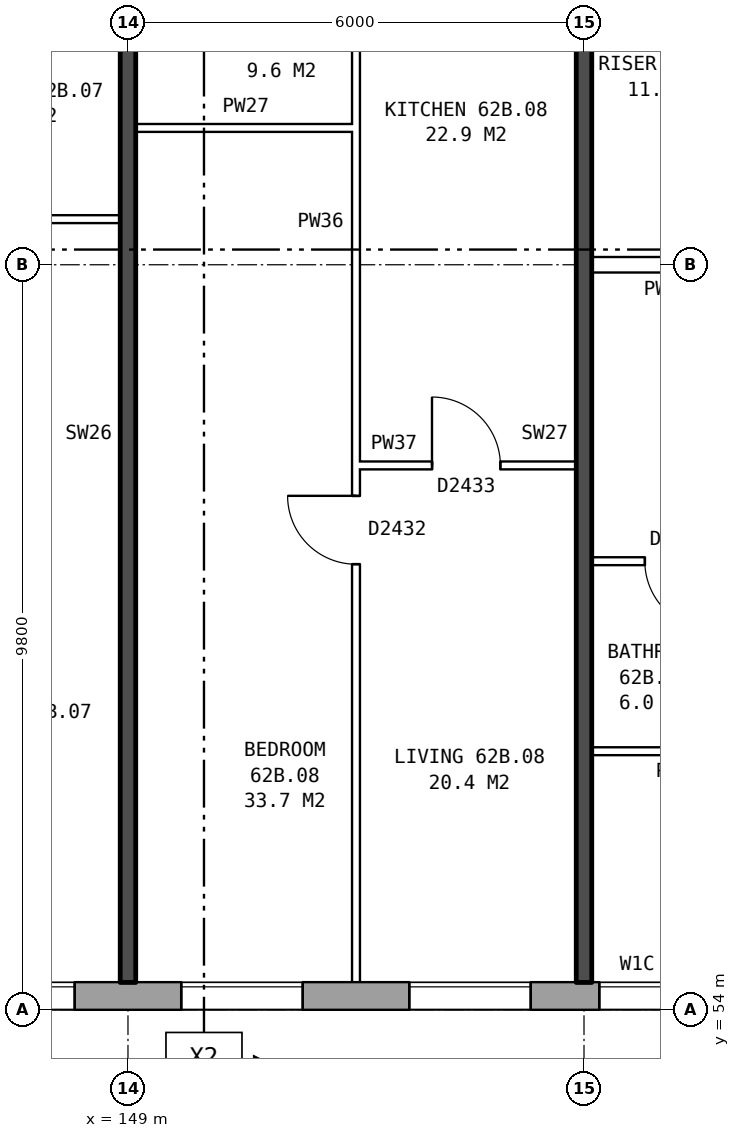
"""IFC4 building model, lengths in metres.
Left out: names, types, materials, properties, quantities, classifications, styles, units other than length and angle.
Written with IfcOpenShell. Run it as: python <this file> out.ifc"""

import sys

from ifc_helpers import new_model, si_unit, direction, frame, frame_2d, origin, place, context, subcontext, project, spatial, rectangle, extrude, element, fill, save


model = new_model("IFC4")
c1 = context("Model", 3, precision=1e-05, world=origin(), true_north=direction((0.0, 1.0)))
c2 = subcontext(c1, "Body", "Model", "MODEL_VIEW")
j1 = project(units=[si_unit("LENGTHUNIT", "METRE"), si_unit("PLANEANGLEUNIT", "RADIAN")], contexts=[c1])
p1 = place(None, origin())
s1 = spatial("IfcSite", under=j1, at=p1, CompositionType="ELEMENT")
p2 = place(p1, origin())
s2 = spatial("IfcBuilding", under=s1, at=p2, CompositionType="ELEMENT")
p3 = place(p2, frame((0.0, 0.0, 221.4)))
s3 = spatial("IfcBuildingStorey", under=s2, at=p3, CompositionType="ELEMENT", Elevation=221.4)
p4 = place(p3, frame((132.05, 54.18, 0.0), z_axis=(0.0, 0.0, 1.0), x_axis=(1.0, 0.0, 0.0)))
e1 = element("IfcWall", 1, at=p4, inside=s3, PredefinedType="STANDARD", context=c2, shape_type="SweptSolid", body=[
    extrude(rectangle(XDim=33.875, YDim=0.36, at=frame_2d((16.938, 0.0))), origin(), (0.0, 0.0, 1.0), 2.85),
])
p5 = place(p4, frame((2.65, 0.0, 0.8)))
e2 = element("IfcOpeningElement", 2, at=p5, cuts=e1, PredefinedType="OPENING", context=c2, shape_type="SweptSolid", body=[
    extrude(rectangle(XDim=1.6, YDim=1.8, at=frame_2d((0.8, 0.9))), frame((0.0, 0.19, 0.0), z_axis=(0.0, -1.0, 0.0), x_axis=(1.0, 0.0, 0.0)), (0.0, 0.0, 1.0), 0.38),
])
p6 = place(p4, frame((5.65, 0.0, 0.8)))
e3 = element("IfcOpeningElement", 3, at=p6, cuts=e1, PredefinedType="OPENING", context=c2, shape_type="SweptSolid", body=[
    extrude(rectangle(XDim=1.6, YDim=1.8, at=frame_2d((0.8, 0.9))), frame((0.0, 0.19, 0.0), z_axis=(0.0, -1.0, 0.0), x_axis=(1.0, 0.0, 0.0)), (0.0, 0.0, 1.0), 0.38),
])
p7 = place(p4, frame((7.55, 0.0, 0.8)))
e4 = element("IfcOpeningElement", 4, at=p7, cuts=e1, PredefinedType="OPENING", context=c2, shape_type="SweptSolid", body=[
    extrude(rectangle(XDim=1.6, YDim=1.8, at=frame_2d((0.8, 0.9))), frame((0.0, 0.19, 0.0), z_axis=(0.0, -1.0, 0.0), x_axis=(1.0, 0.0, 0.0)), (0.0, 0.0, 1.0), 0.38),
])
p8 = place(p4, frame((11.65, 0.0, 0.8)))
e5 = element("IfcOpeningElement", 5, at=p8, cuts=e1, PredefinedType="OPENING", context=c2, shape_type="SweptSolid", body=[
    extrude(rectangle(XDim=1.6, YDim=1.8, at=frame_2d((0.8, 0.9))), frame((0.0, 0.19, 0.0), z_axis=(0.0, -1.0, 0.0), x_axis=(1.0, 0.0, 0.0)), (0.0, 0.0, 1.0), 0.38),
])
p9 = place(p4, frame((14.65, 0.0, 0.8)))
e6 = element("IfcOpeningElement", 6, at=p9, cuts=e1, PredefinedType="OPENING", context=c2, shape_type="SweptSolid", body=[
    extrude(rectangle(XDim=1.6, YDim=1.8, at=frame_2d((0.8, 0.9))), frame((0.0, 0.19, 0.0), z_axis=(0.0, -1.0, 0.0), x_axis=(1.0, 0.0, 0.0)), (0.0, 0.0, 1.0), 0.38),
])
p10 = place(p4, frame((17.65, 0.0, 0.8)))
e7 = element("IfcOpeningElement", 7, at=p10, cuts=e1, PredefinedType="OPENING", context=c2, shape_type="SweptSolid", body=[
    extrude(rectangle(XDim=1.6, YDim=1.8, at=frame_2d((0.8, 0.9))), frame((0.0, 0.19, 0.0), z_axis=(0.0, -1.0, 0.0), x_axis=(1.0, 0.0, 0.0)), (0.0, 0.0, 1.0), 0.38),
])
p11 = place(p4, frame((20.65, 0.0, 0.8)))
e8 = element("IfcOpeningElement", 8, at=p11, cuts=e1, PredefinedType="OPENING", context=c2, shape_type="SweptSolid", body=[
    extrude(rectangle(XDim=1.6, YDim=1.8, at=frame_2d((0.8, 0.9))), frame((0.0, 0.19, 0.0), z_axis=(0.0, -1.0, 0.0), x_axis=(1.0, 0.0, 0.0)), (0.0, 0.0, 1.0), 0.38),
])
p12 = place(p4, frame((23.15, 0.0, 0.8)))
e9 = element("IfcOpeningElement", 9, at=p12, cuts=e1, PredefinedType="OPENING", context=c2, shape_type="SweptSolid", body=[
    extrude(rectangle(XDim=1.0, YDim=1.8, at=frame_2d((0.5, 0.9))), frame((0.0, 0.19, 0.0), z_axis=(0.0, -1.0, 0.0), x_axis=(1.0, 0.0, 0.0)), (0.0, 0.0, 1.0), 0.38),
])
p13 = place(p4, frame((26.65, 0.0, 0.8)))
e10 = element("IfcOpeningElement", 10, at=p13, cuts=e1, PredefinedType="OPENING", context=c2, shape_type="SweptSolid", body=[
    extrude(rectangle(XDim=1.6, YDim=1.8, at=frame_2d((0.8, 0.9))), frame((0.0, 0.19, 0.0), z_axis=(0.0, -1.0, 0.0), x_axis=(1.0, 0.0, 0.0)), (0.0, 0.0, 1.0), 0.38),
])
p14 = place(p4, frame((29.65, 0.0, 0.8)))
e11 = element("IfcOpeningElement", 11, at=p14, cuts=e1, PredefinedType="OPENING", context=c2, shape_type="SweptSolid", body=[
    extrude(rectangle(XDim=1.6, YDim=1.8, at=frame_2d((0.8, 0.9))), frame((0.0, 0.19, 0.0), z_axis=(0.0, -1.0, 0.0), x_axis=(1.0, 0.0, 0.0)), (0.0, 0.0, 1.0), 0.38),
])
p15 = place(p4, frame((9.45, 0.0, 1.7)))
e12 = element("IfcOpeningElement", 12, at=p15, cuts=e1, PredefinedType="OPENING", context=c2, shape_type="SweptSolid", body=[
    extrude(rectangle(XDim=0.6, YDim=0.9, at=frame_2d((0.3, 0.45))), frame((0.0, 0.19, 0.0), z_axis=(0.0, -1.0, 0.0), x_axis=(1.0, 0.0, 0.0)), (0.0, 0.0, 1.0), 0.38),
])
p16 = place(p3, frame((155.1, 57.4, 0.0), z_axis=(0.0, 0.0, 1.0), x_axis=(1.0, 0.0, 0.0)))
e13 = element("IfcWall", 13, at=p16, inside=s3, PredefinedType="PARTITIONING", context=c2, shape_type="SweptSolid", body=[
    extrude(rectangle(XDim=2.3, YDim=0.1, at=frame_2d((1.15, 0.0))), origin(), (0.0, 0.0, 1.0), 2.85),
])
p17 = place(p3, frame((155.1, 59.9, 0.0), z_axis=(0.0, 0.0, 1.0), x_axis=(1.0, 0.0, 0.0)))
e14 = element("IfcWall", 14, at=p17, inside=s3, PredefinedType="PARTITIONING", context=c2, shape_type="SweptSolid", body=[
    extrude(rectangle(XDim=5.8, YDim=0.1, at=frame_2d((2.9, 0.0))), origin(), (0.0, 0.0, 1.0), 2.85),
])
p18 = place(p17, frame((3.6, 0.0, 0.0)))
e15 = element("IfcOpeningElement", 15, at=p18, cuts=e14, PredefinedType="OPENING", context=c2, shape_type="SweptSolid", body=[
    extrude(rectangle(XDim=0.9, YDim=2.1, at=frame_2d((0.45, 1.05))), frame((0.0, 0.06, 0.0), z_axis=(0.0, -1.0, 0.0), x_axis=(1.0, 0.0, 0.0)), (0.0, 0.0, 1.0), 0.12),
])
p19 = place(p17, frame((0.7, 0.0, 0.0)))
e16 = element("IfcOpeningElement", 16, at=p19, cuts=e14, PredefinedType="OPENING", context=c2, shape_type="SweptSolid", body=[
    extrude(rectangle(XDim=0.9, YDim=2.1, at=frame_2d((0.45, 1.05))), frame((0.0, 0.06, 0.0), z_axis=(0.0, -1.0, 0.0), x_axis=(1.0, 0.0, 0.0)), (0.0, 0.0, 1.0), 0.12),
])
p20 = place(p3, frame((152.0, 61.16, 0.0), z_axis=(0.0, 0.0, 1.0), x_axis=(1.0, 0.0, 0.0)))
e17 = element("IfcWall", 17, at=p20, inside=s3, PredefinedType="PARTITIONING", context=c2, shape_type="SweptSolid", body=[
    extrude(rectangle(XDim=2.9, YDim=0.1, at=frame_2d((1.45, 0.0))), origin(), (0.0, 0.0, 1.0), 2.85),
])
p21 = place(p20, frame((1.0, 0.0, 0.0)))
e18 = element("IfcOpeningElement", 18, at=p21, cuts=e17, PredefinedType="OPENING", context=c2, shape_type="SweptSolid", body=[
    extrude(rectangle(XDim=0.9, YDim=2.1, at=frame_2d((0.45, 1.05))), frame((0.0, 0.06, 0.0), z_axis=(0.0, -1.0, 0.0), x_axis=(1.0, 0.0, 0.0)), (0.0, 0.0, 1.0), 0.12),
])
p22 = place(p3, frame((155.1, 63.8, 0.0), z_axis=(0.0, 0.0, 1.0), x_axis=(1.0, 0.0, 0.0)))
e19 = element("IfcWall", 19, at=p22, inside=s3, PredefinedType="PARTITIONING", context=c2, shape_type="SweptSolid", body=[
    extrude(rectangle(XDim=2.14, YDim=0.2, at=frame_2d((1.07, 0.0))), origin(), (0.0, 0.0, 1.0), 2.85),
])
for number, where, z_axis, x_axis in (
    (20, (146.0, 64.4, 0.0), (0.0, 0.0, 1.0), (1.0, 0.0, 0.0)),
    (21, (149.1, 65.6, 0.0), (0.0, 0.0, 1.0), (1.0, 0.0, 0.0)),
):
    element("IfcWall", number, at=place(p3, frame(where, z_axis=z_axis, x_axis=x_axis)), inside=s3, PredefinedType="PARTITIONING", context=c2, shape_type="SweptSolid", body=[
        extrude(rectangle(XDim=2.9, YDim=0.1, at=frame_2d((1.45, 0.0))), origin(), (0.0, 0.0, 1.0), 2.85),
    ])
p23 = place(p3, frame((149.0, 54.36, 0.0), z_axis=(0.0, 0.0, 1.0), x_axis=(0.0, 1.0, 0.0)))
e22 = element("IfcWall", 22, at=p23, inside=s3, PredefinedType="SOLIDWALL", context=c2, shape_type="SweptSolid", body=[
    extrude(rectangle(XDim=14.44, YDim=0.2, at=frame_2d((7.22, 0.0))), origin(), (0.0, 0.0, 1.0), 2.85),
])
p24 = place(p3, frame((152.0, 54.36, 0.0), z_axis=(0.0, 0.0, 1.0), x_axis=(0.0, 1.0, 0.0)))
e23 = element("IfcWall", 23, at=p24, inside=s3, PredefinedType="PARTITIONING", context=c2, shape_type="SweptSolid", body=[
    extrude(rectangle(XDim=14.34, YDim=0.1, at=frame_2d((7.17, 0.0))), origin(), (0.0, 0.0, 1.0), 2.85),
])
p25 = place(p24, frame((5.5, 0.0, 0.0)))
e24 = element("IfcOpeningElement", 24, at=p25, cuts=e23, PredefinedType="OPENING", context=c2, shape_type="SweptSolid", body=[
    extrude(rectangle(XDim=0.9, YDim=2.1, at=frame_2d((0.45, 1.05))), frame((0.0, 0.06, 0.0), z_axis=(0.0, -1.0, 0.0), x_axis=(1.0, 0.0, 0.0)), (0.0, 0.0, 1.0), 0.12),
])
p26 = place(p24, frame((13.04, 0.0, 0.0)))
e25 = element("IfcOpeningElement", 25, at=p26, cuts=e23, PredefinedType="OPENING", context=c2, shape_type="SweptSolid", body=[
    extrude(rectangle(XDim=0.9, YDim=2.1, at=frame_2d((0.45, 1.05))), frame((0.0, 0.06, 0.0), z_axis=(0.0, -1.0, 0.0), x_axis=(1.0, 0.0, 0.0)), (0.0, 0.0, 1.0), 0.12),
])
p27 = place(p3, frame((155.0, 54.36, 0.0), z_axis=(0.0, 0.0, 1.0), x_axis=(0.0, 1.0, 0.0)))
e26 = element("IfcWall", 26, at=p27, inside=s3, PredefinedType="SOLIDWALL", context=c2, shape_type="SweptSolid", body=[
    extrude(rectangle(XDim=14.44, YDim=0.2, at=frame_2d((7.22, 0.0))), origin(), (0.0, 0.0, 1.0), 2.85),
])
p28 = place(p9, origin())
e27 = element("IfcWindow", 27, at=p28, inside=s3, PartitioningType="SINGLE_PANEL", PredefinedType="WINDOW", context=c2, shape_type="SweptSolid", body=[
    extrude(rectangle(XDim=1.6, YDim=1.8, at=frame_2d((0.8, 0.9))), frame((0.0, 0.15, 0.0), z_axis=(0.0, -1.0, 0.0), x_axis=(1.0, 0.0, 0.0)), (0.0, 0.0, 1.0), 0.06),
])
fill(e6, e27)
p29 = place(p10, origin())
e28 = element("IfcWindow", 28, at=p29, inside=s3, PartitioningType="SINGLE_PANEL", PredefinedType="WINDOW", context=c2, shape_type="SweptSolid", body=[
    extrude(rectangle(XDim=1.6, YDim=1.8, at=frame_2d((0.8, 0.9))), frame((0.0, 0.15, 0.0), z_axis=(0.0, -1.0, 0.0), x_axis=(1.0, 0.0, 0.0)), (0.0, 0.0, 1.0), 0.06),
])
fill(e7, e28)
p30 = place(p11, origin())
e29 = element("IfcWindow", 29, at=p30, inside=s3, PartitioningType="SINGLE_PANEL", PredefinedType="WINDOW", context=c2, shape_type="SweptSolid", body=[
    extrude(rectangle(XDim=1.6, YDim=1.8, at=frame_2d((0.8, 0.9))), frame((0.0, 0.15, 0.0), z_axis=(0.0, -1.0, 0.0), x_axis=(1.0, 0.0, 0.0)), (0.0, 0.0, 1.0), 0.06),
])
fill(e8, e29)
p31 = place(p12, origin())
e30 = element("IfcWindow", 30, at=p31, inside=s3, PartitioningType="SINGLE_PANEL", PredefinedType="WINDOW", context=c2, shape_type="SweptSolid", body=[
    extrude(rectangle(XDim=1.0, YDim=1.8, at=frame_2d((0.5, 0.9))), frame((0.0, 0.15, 0.0), z_axis=(0.0, -1.0, 0.0), x_axis=(1.0, 0.0, 0.0)), (0.0, 0.0, 1.0), 0.06),
])
fill(e9, e30)
p32 = place(p19, frame((0.9, 0.0, 0.0), z_axis=(0.0, 0.0, 1.0), x_axis=(-1.0, 0.0, 0.0)))
e31 = element("IfcDoor", 31, at=p32, inside=s3, OperationType="SINGLE_SWING_LEFT", PredefinedType="DOOR", context=c2, shape_type="SweptSolid", body=[
    extrude(rectangle(XDim=0.9, YDim=2.1, at=frame_2d((0.45, 1.05))), frame((0.0, 0.025, 0.0), z_axis=(0.0, -1.0, 0.0), x_axis=(1.0, 0.0, 0.0)), (0.0, 0.0, 1.0), 0.05),
])
fill(e16, e31)
p33 = place(p25, origin())
e32 = element("IfcDoor", 32, at=p33, inside=s3, OperationType="SINGLE_SWING_RIGHT", PredefinedType="DOOR", context=c2, shape_type="SweptSolid", body=[
    extrude(rectangle(XDim=0.9, YDim=2.1, at=frame_2d((0.45, 1.05))), frame((0.0, 0.025, 0.0), z_axis=(0.0, -1.0, 0.0), x_axis=(1.0, 0.0, 0.0)), (0.0, 0.0, 1.0), 0.05),
])
fill(e24, e32)
p34 = place(p21, origin())
e33 = element("IfcDoor", 33, at=p34, inside=s3, OperationType="SINGLE_SWING_LEFT", PredefinedType="DOOR", context=c2, shape_type="SweptSolid", body=[
    extrude(rectangle(XDim=0.9, YDim=2.1, at=frame_2d((0.45, 1.05))), frame((0.0, 0.025, 0.0), z_axis=(0.0, -1.0, 0.0), x_axis=(1.0, 0.0, 0.0)), (0.0, 0.0, 1.0), 0.05),
])
fill(e18, e33)
save(model, sys.argv[1])
